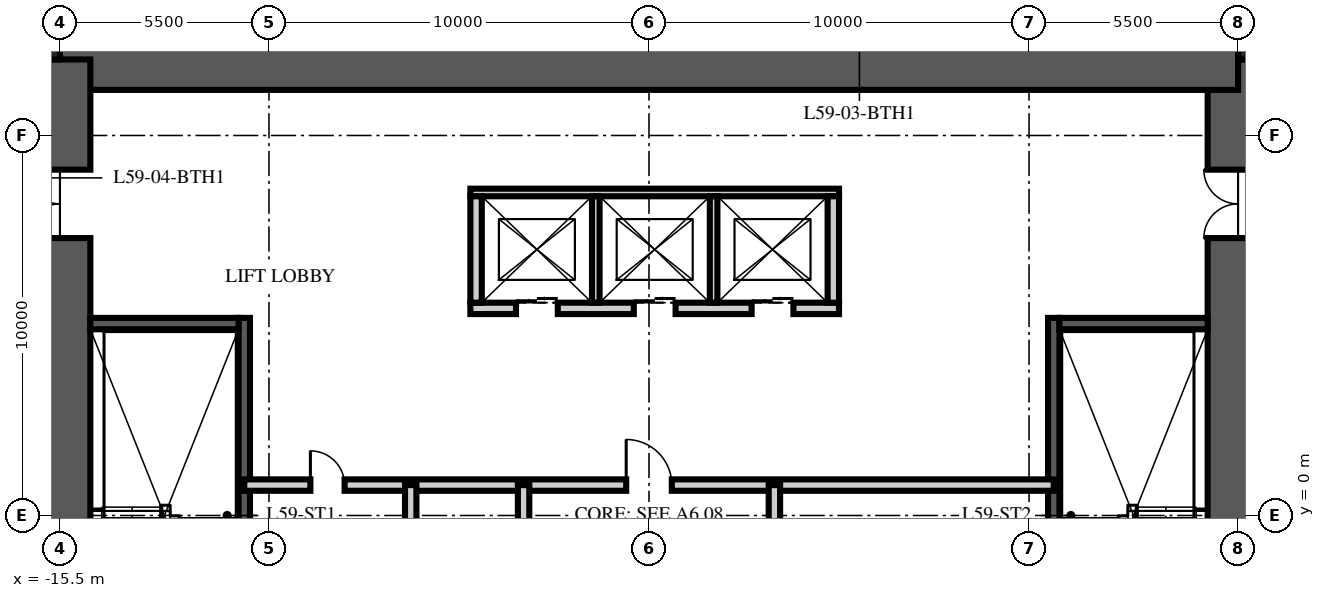
"""IFC4 building model, lengths in metres.
Left out: names, types, materials, properties, quantities, classifications, styles, units other than length and angle.
Written with IfcOpenShell. Run it as: python <this file> out.ifc"""

import sys

from ifc_helpers import new_model, si_unit, direction, frame, frame_2d, origin, origin_2d, place, context, subcontext, project, spatial, rectangle, extrude, element, fill, save


model = new_model("IFC4")
c1 = context("Model", 3, precision=1e-05, world=origin(), true_north=direction((0.0, 1.0)))
c2 = subcontext(c1, "Body", "Model", "MODEL_VIEW")
j1 = project(units=[si_unit("LENGTHUNIT", "METRE"), si_unit("PLANEANGLEUNIT", "RADIAN")], contexts=[c1])
p1 = place(None, origin())
s1 = spatial("IfcSite", under=j1, at=p1, CompositionType="ELEMENT")
p2 = place(p1, origin())
s2 = spatial("IfcBuilding", under=s1, at=p2, CompositionType="ELEMENT")
p3 = place(p2, frame((0.0, 0.0, 237.0)))
s3 = spatial("IfcBuildingStorey", under=s2, at=p3, CompositionType="ELEMENT", Elevation=237.0)
p4 = place(p3, frame((15.5, -12.0, -0.25), z_axis=(0.0, 0.0, 1.0), x_axis=(0.0, 1.0, 0.0)))
e1 = element("IfcWall", 1, at=p4, inside=s3, PredefinedType="SHEAR", context=c2, shape_type="SweptSolid", body=[
    extrude(rectangle(XDim=24.0, YDim=1.6, at=frame_2d((12.0, 0.0))), origin(), (0.0, 0.0, 1.0), 3.75),
])
p5 = place(p4, frame((3.2, 0.0, 0.25)))
e2 = element("IfcOpeningElement", 2, at=p5, cuts=e1, PredefinedType="OPENING", context=c2, shape_type="SweptSolid", body=[
    extrude(rectangle(XDim=1.2, YDim=2.1, at=frame_2d((0.6, 1.05))), frame((0.0, 0.81, 0.0), z_axis=(0.0, -1.0, 0.0), x_axis=(1.0, 0.0, 0.0)), (0.0, 0.0, 1.0), 1.62),
])
p6 = place(p4, frame((19.3, 0.0, 0.25)))
e3 = element("IfcOpeningElement", 3, at=p6, cuts=e1, PredefinedType="OPENING", context=c2, shape_type="SweptSolid", body=[
    extrude(rectangle(XDim=1.8, YDim=2.1, at=frame_2d((0.9, 1.05))), frame((0.0, 0.81, 0.0), z_axis=(0.0, -1.0, 0.0), x_axis=(1.0, 0.0, 0.0)), (0.0, 0.0, 1.0), 1.62),
])
p7 = place(p3, frame((-15.5, 12.0, -0.25), z_axis=(0.0, 0.0, 1.0), x_axis=(1.0, 0.0, 0.0)))
e4 = element("IfcWall", 4, at=p7, inside=s3, PredefinedType="SHEAR", context=c2, shape_type="SweptSolid", body=[
    extrude(rectangle(XDim=31.0, YDim=1.6, at=frame_2d((15.5, 0.0))), origin(), (0.0, 0.0, 1.0), 3.75),
])
p8 = place(p3, frame((-15.5, -12.0, -0.25), z_axis=(0.0, 0.0, 1.0), x_axis=(0.0, 1.0, 0.0)))
e5 = element("IfcWall", 5, at=p8, inside=s3, PredefinedType="SHEAR", context=c2, shape_type="SweptSolid", body=[
    extrude(rectangle(XDim=24.0, YDim=1.6, at=frame_2d((12.0, 0.0))), origin(), (0.0, 0.0, 1.0), 3.75),
])
p9 = place(p8, frame((3.2, 0.0, 0.25)))
e6 = element("IfcOpeningElement", 6, at=p9, cuts=e5, PredefinedType="OPENING", context=c2, shape_type="SweptSolid", body=[
    extrude(rectangle(XDim=1.2, YDim=2.1, at=frame_2d((0.6, 1.05))), frame((0.0, 0.81, 0.0), z_axis=(0.0, -1.0, 0.0), x_axis=(1.0, 0.0, 0.0)), (0.0, 0.0, 1.0), 1.62),
])
p10 = place(p8, frame((19.3, 0.0, 0.25)))
e7 = element("IfcOpeningElement", 7, at=p10, cuts=e5, PredefinedType="OPENING", context=c2, shape_type="SweptSolid", body=[
    extrude(rectangle(XDim=1.8, YDim=2.1, at=frame_2d((0.9, 1.05))), frame((0.0, 0.81, 0.0), z_axis=(0.0, -1.0, 0.0), x_axis=(1.0, 0.0, 0.0)), (0.0, 0.0, 1.0), 1.62),
])
for number, where, z_axis, x_axis in (
    (8, (15.9, 12.4, -0.25), (0.0, 0.0, 1.0), (1.0, 0.0, 0.0)),
    (9, (-15.9, 12.4, -0.25), (0.0, 0.0, 1.0), (1.0, 0.0, 0.0)),
):
    element("IfcColumn", number, at=place(p3, frame(where, z_axis=z_axis, x_axis=x_axis)), inside=s3, PredefinedType="COLUMN", context=c2, shape_type="SweptSolid", body=[
        extrude(rectangle(XDim=0.8, YDim=0.8, at=origin_2d()), origin(), (0.0, 0.0, 1.0), 3.75),
    ])
p11 = place(p3, frame((-10.65, -4.9, 0.0), z_axis=(0.0, 0.0, 1.0), x_axis=(0.0, 1.0, 0.0)))
e10 = element("IfcWall", 10, at=p11, inside=s3, PredefinedType="SOLIDWALL", context=c2, shape_type="SweptSolid", body=[
    extrude(rectangle(XDim=10.1, YDim=0.3, at=frame_2d((5.05, 0.0))), origin(), (0.0, 0.0, 1.0), 3.5),
])
p12 = place(p3, frame((-14.7, 5.05, 0.0), z_axis=(0.0, 0.0, 1.0), x_axis=(1.0, 0.0, 0.0)))
e11 = element("IfcWall", 11, at=p12, inside=s3, PredefinedType="SOLIDWALL", context=c2, shape_type="SweptSolid", body=[
    extrude(rectangle(XDim=3.9, YDim=0.3, at=frame_2d((1.95, 0.0))), origin(), (0.0, 0.0, 1.0), 3.5),
])
p13 = place(p3, frame((10.65, -4.9, 0.0), z_axis=(0.0, 0.0, 1.0), x_axis=(0.0, 1.0, 0.0)))
e12 = element("IfcWall", 12, at=p13, inside=s3, PredefinedType="SOLIDWALL", context=c2, shape_type="SweptSolid", body=[
    extrude(rectangle(XDim=10.1, YDim=0.3, at=frame_2d((5.05, 0.0))), origin(), (0.0, 0.0, 1.0), 3.5),
])
p14 = place(p3, frame((14.7, 5.05, 0.0), z_axis=(0.0, 0.0, 1.0), x_axis=(-1.0, 0.0, 0.0)))
e13 = element("IfcWall", 13, at=p14, inside=s3, PredefinedType="SOLIDWALL", context=c2, shape_type="SweptSolid", body=[
    extrude(rectangle(XDim=3.9, YDim=0.3, at=frame_2d((1.95, 0.0))), origin(), (0.0, 0.0, 1.0), 3.5),
])
p15 = place(p3, frame((-4.7, 5.45, 0.0), z_axis=(0.0, 0.0, 1.0), x_axis=(1.0, 0.0, 0.0)))
e14 = element("IfcWall", 14, at=p15, inside=s3, PredefinedType="PARTITIONING", context=c2, shape_type="SweptSolid", body=[
    extrude(rectangle(XDim=9.7, YDim=0.3, at=frame_2d((4.85, 0.0))), origin(), (0.0, 0.0, 1.0), 3.5),
])
p16 = place(p15, frame((1.2, 0.0, 0.0)))
e15 = element("IfcOpeningElement", 15, at=p16, cuts=e14, PredefinedType="OPENING", context=c2, shape_type="SweptSolid", body=[
    extrude(rectangle(XDim=1.1, YDim=2.1, at=frame_2d((0.55, 1.05))), frame((0.0, 0.16, 0.0), z_axis=(0.0, -1.0, 0.0), x_axis=(1.0, 0.0, 0.0)), (0.0, 0.0, 1.0), 0.32),
])
p17 = place(p15, frame((4.3, 0.0, 0.0)))
e16 = element("IfcOpeningElement", 16, at=p17, cuts=e14, PredefinedType="OPENING", context=c2, shape_type="SweptSolid", body=[
    extrude(rectangle(XDim=1.1, YDim=2.1, at=frame_2d((0.55, 1.05))), frame((0.0, 0.16, 0.0), z_axis=(0.0, -1.0, 0.0), x_axis=(1.0, 0.0, 0.0)), (0.0, 0.0, 1.0), 0.32),
])
p18 = place(p15, frame((7.4, 0.0, 0.0)))
e17 = element("IfcOpeningElement", 17, at=p18, cuts=e14, PredefinedType="OPENING", context=c2, shape_type="SweptSolid", body=[
    extrude(rectangle(XDim=1.1, YDim=2.1, at=frame_2d((0.55, 1.05))), frame((0.0, 0.16, 0.0), z_axis=(0.0, -1.0, 0.0), x_axis=(1.0, 0.0, 0.0)), (0.0, 0.0, 1.0), 0.32),
])
p19 = place(p3, frame((-4.7, 8.5, 0.0), z_axis=(0.0, 0.0, 1.0), x_axis=(1.0, 0.0, 0.0)))
e18 = element("IfcWall", 18, at=p19, inside=s3, PredefinedType="PARTITIONING", context=c2, shape_type="SweptSolid", body=[
    extrude(rectangle(XDim=9.7, YDim=0.2, at=frame_2d((4.85, 0.0))), origin(), (0.0, 0.0, 1.0), 3.5),
])
for number, where, z_axis, x_axis in (
    (19, (-4.55, 5.6, 0.0), (0.0, 0.0, 1.0), (0.0, 1.0, 0.0)),
    (20, (4.85, 5.6, 0.0), (0.0, 0.0, 1.0), (0.0, 1.0, 0.0)),
):
    element("IfcWall", number, at=place(p3, frame(where, z_axis=z_axis, x_axis=x_axis)), inside=s3, PredefinedType="PARTITIONING", context=c2, shape_type="SweptSolid", body=[
        extrude(rectangle(XDim=2.8, YDim=0.3, at=frame_2d((1.4, 0.0))), origin(), (0.0, 0.0, 1.0), 3.5),
    ])
for number, where, z_axis, x_axis in (
    (21, (-1.4, 5.6, 0.0), (0.0, 0.0, 1.0), (0.0, 1.0, 0.0)),
    (22, (1.7, 5.6, 0.0), (0.0, 0.0, 1.0), (0.0, 1.0, 0.0)),
):
    element("IfcWall", number, at=place(p3, frame(where, z_axis=z_axis, x_axis=x_axis)), inside=s3, PredefinedType="PARTITIONING", context=c2, shape_type="SweptSolid", body=[
        extrude(rectangle(XDim=2.8, YDim=0.2, at=frame_2d((1.4, 0.0))), origin(), (0.0, 0.0, 1.0), 3.5),
    ])
p20 = place(p3, frame((-10.65, 0.8, 0.0), z_axis=(0.0, 0.0, 1.0), x_axis=(1.0, 0.0, 0.0)))
e23 = element("IfcWall", 23, at=p20, inside=s3, PredefinedType="PARTITIONING", context=c2, shape_type="SweptSolid", body=[
    extrude(rectangle(XDim=21.3, YDim=0.3, at=frame_2d((10.65, 0.0))), origin(), (0.0, 0.0, 1.0), 3.5),
])
p21 = place(p20, frame((10.05, 0.0, 0.0)))
e24 = element("IfcOpeningElement", 24, at=p21, cuts=e23, PredefinedType="OPENING", context=c2, shape_type="SweptSolid", body=[
    extrude(rectangle(XDim=1.2, YDim=2.1, at=frame_2d((0.6, 1.05))), frame((0.0, 0.16, 0.0), z_axis=(0.0, -1.0, 0.0), x_axis=(1.0, 0.0, 0.0)), (0.0, 0.0, 1.0), 0.32),
])
p22 = place(p20, frame((1.74, 0.0, 0.0)))
e25 = element("IfcOpeningElement", 25, at=p22, cuts=e23, PredefinedType="OPENING", context=c2, shape_type="SweptSolid", body=[
    extrude(rectangle(XDim=0.9, YDim=2.1, at=frame_2d((0.45, 1.05))), frame((0.0, 0.16, 0.0), z_axis=(0.0, -1.0, 0.0), x_axis=(1.0, 0.0, 0.0)), (0.0, 0.0, 1.0), 0.32),
])
p23 = place(p3, frame((-3.3, -6.65, 0.0), z_axis=(0.0, 0.0, 1.0), x_axis=(0.0, 1.0, 0.0)))
e26 = element("IfcWall", 26, at=p23, inside=s3, PredefinedType="PARTITIONING", context=c2, shape_type="SweptSolid", body=[
    extrude(rectangle(XDim=7.45, YDim=0.3, at=frame_2d((3.725, 0.0))), origin(), (0.0, 0.0, 1.0), 3.5),
])
p24 = place(p23, frame((3.275, 0.0, 0.0)))
e27 = element("IfcOpeningElement", 27, at=p24, cuts=e26, PredefinedType="OPENING", context=c2, shape_type="SweptSolid", body=[
    extrude(rectangle(XDim=0.9, YDim=2.1, at=frame_2d((0.45, 1.05))), frame((0.0, 0.16, 0.0), z_axis=(0.0, -1.0, 0.0), x_axis=(1.0, 0.0, 0.0)), (0.0, 0.0, 1.0), 0.32),
])
p25 = place(p3, frame((3.3, -6.65, 0.0), z_axis=(0.0, 0.0, 1.0), x_axis=(0.0, 1.0, 0.0)))
e28 = element("IfcWall", 28, at=p25, inside=s3, PredefinedType="PARTITIONING", context=c2, shape_type="SweptSolid", body=[
    extrude(rectangle(XDim=7.45, YDim=0.3, at=frame_2d((3.725, 0.0))), origin(), (0.0, 0.0, 1.0), 3.5),
])
p26 = place(p25, frame((1.231, 0.0, 0.0)))
e29 = element("IfcOpeningElement", 29, at=p26, cuts=e28, PredefinedType="OPENING", context=c2, shape_type="SweptSolid", body=[
    extrude(rectangle(XDim=0.9, YDim=2.1, at=frame_2d((0.45, 1.05))), frame((0.0, 0.16, 0.0), z_axis=(0.0, -1.0, 0.0), x_axis=(1.0, 0.0, 0.0)), (0.0, 0.0, 1.0), 0.32),
])
p27 = place(p25, frame((4.956, 0.0, 0.0)))
e30 = element("IfcOpeningElement", 30, at=p27, cuts=e28, PredefinedType="OPENING", context=c2, shape_type="SweptSolid", body=[
    extrude(rectangle(XDim=0.9, YDim=2.1, at=frame_2d((0.45, 1.05))), frame((0.0, 0.16, 0.0), z_axis=(0.0, -1.0, 0.0), x_axis=(1.0, 0.0, 0.0)), (0.0, 0.0, 1.0), 0.32),
])
p28 = place(p3, frame((-6.27, -6.65, 0.0), z_axis=(0.0, 0.0, 1.0), x_axis=(0.0, 1.0, 0.0)))
e31 = element("IfcWall", 31, at=p28, inside=s3, PredefinedType="PARTITIONING", context=c2, shape_type="SweptSolid", body=[
    extrude(rectangle(XDim=7.45, YDim=0.3, at=frame_2d((3.725, 0.0))), origin(), (0.0, 0.0, 1.0), 3.5),
])
p29 = place(p10, origin())
e32 = element("IfcDoor", 32, at=p29, inside=s3, OperationType="DOUBLE_DOOR_SINGLE_SWING", PredefinedType="DOOR", context=c2, shape_type="SweptSolid", body=[
    extrude(rectangle(XDim=1.8, YDim=2.1, at=frame_2d((0.9, 1.05))), frame((0.0, 0.025, 0.0), z_axis=(0.0, -1.0, 0.0), x_axis=(1.0, 0.0, 0.0)), (0.0, 0.0, 1.0), 0.05),
])
fill(e7, e32)
p30 = place(p6, origin())
e33 = element("IfcDoor", 33, at=p30, inside=s3, OperationType="DOUBLE_DOOR_SINGLE_SWING", PredefinedType="DOOR", context=c2, shape_type="SweptSolid", body=[
    extrude(rectangle(XDim=1.8, YDim=2.1, at=frame_2d((0.9, 1.05))), frame((0.0, 0.025, 0.0), z_axis=(0.0, -1.0, 0.0), x_axis=(1.0, 0.0, 0.0)), (0.0, 0.0, 1.0), 0.05),
])
fill(e3, e33)
p31 = place(p16, origin())
e34 = element("IfcDoor", 34, at=p31, inside=s3, OperationType="DOUBLE_DOOR_SLIDING", PredefinedType="DOOR", context=c2, shape_type="SweptSolid", body=[
    extrude(rectangle(XDim=1.1, YDim=2.1, at=frame_2d((0.55, 1.05))), frame((0.0, 0.025, 0.0), z_axis=(0.0, -1.0, 0.0), x_axis=(1.0, 0.0, 0.0)), (0.0, 0.0, 1.0), 0.05),
])
fill(e15, e34)
p32 = place(p17, origin())
e35 = element("IfcDoor", 35, at=p32, inside=s3, OperationType="DOUBLE_DOOR_SLIDING", PredefinedType="DOOR", context=c2, shape_type="SweptSolid", body=[
    extrude(rectangle(XDim=1.1, YDim=2.1, at=frame_2d((0.55, 1.05))), frame((0.0, 0.025, 0.0), z_axis=(0.0, -1.0, 0.0), x_axis=(1.0, 0.0, 0.0)), (0.0, 0.0, 1.0), 0.05),
])
fill(e16, e35)
p33 = place(p18, origin())
e36 = element("IfcDoor", 36, at=p33, inside=s3, OperationType="DOUBLE_DOOR_SLIDING", PredefinedType="DOOR", context=c2, shape_type="SweptSolid", body=[
    extrude(rectangle(XDim=1.1, YDim=2.1, at=frame_2d((0.55, 1.05))), frame((0.0, 0.025, 0.0), z_axis=(0.0, -1.0, 0.0), x_axis=(1.0, 0.0, 0.0)), (0.0, 0.0, 1.0), 0.05),
])
fill(e17, e36)
p34 = place(p21, origin())
e37 = element("IfcDoor", 37, at=p34, inside=s3, OperationType="SINGLE_SWING_LEFT", PredefinedType="DOOR", context=c2, shape_type="SweptSolid", body=[
    extrude(rectangle(XDim=1.2, YDim=2.1, at=frame_2d((0.6, 1.05))), frame((0.0, 0.025, 0.0), z_axis=(0.0, -1.0, 0.0), x_axis=(1.0, 0.0, 0.0)), (0.0, 0.0, 1.0), 0.05),
])
fill(e24, e37)
p35 = place(p22, origin())
e38 = element("IfcDoor", 38, at=p35, inside=s3, OperationType="SINGLE_SWING_LEFT", PredefinedType="DOOR", context=c2, shape_type="SweptSolid", body=[
    extrude(rectangle(XDim=0.9, YDim=2.1, at=frame_2d((0.45, 1.05))), frame((0.0, 0.025, 0.0), z_axis=(0.0, -1.0, 0.0), x_axis=(1.0, 0.0, 0.0)), (0.0, 0.0, 1.0), 0.05),
])
fill(e25, e38)
save(model, sys.argv[1])
